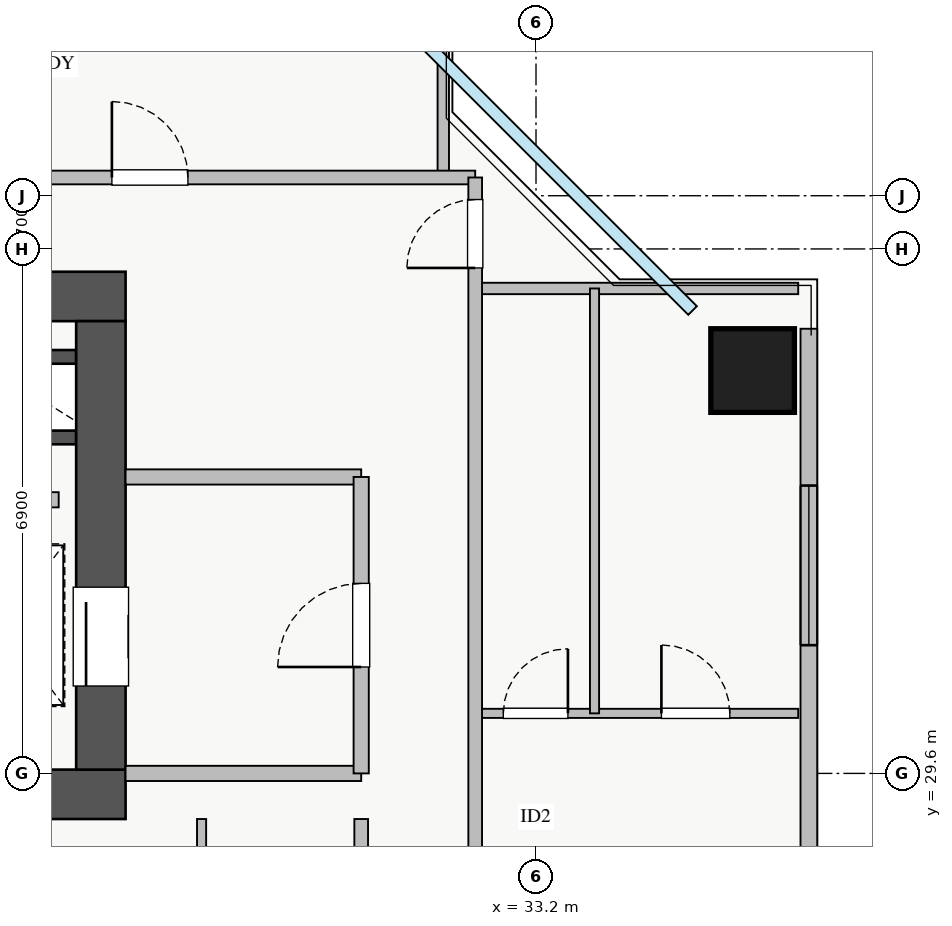
"""IFC4 building model, lengths in metres.
Left out: names, types, materials, properties, quantities, classifications, styles, units other than length and angle.
Written with IfcOpenShell. Run it as: python <this file> out.ifc"""

import sys

from ifc_helpers import new_model, si_unit, direction, frame, frame_2d, origin, origin_2d, place, context, subcontext, project, spatial, rectangle, extrude, source, transform, mapped, element, fill, save


model = new_model("IFC4")
c1 = context("Model", 3, precision=1e-05, world=origin(), true_north=direction((0.0, 1.0)))
c2 = subcontext(c1, "Body", "Model", "MODEL_VIEW")
j1 = project(units=[si_unit("LENGTHUNIT", "METRE"), si_unit("PLANEANGLEUNIT", "RADIAN")], contexts=[c1])
p1 = place(None, origin())
s1 = spatial("IfcSite", under=j1, at=p1, CompositionType="ELEMENT")
p2 = place(p1, origin())
s2 = spatial("IfcBuilding", under=s1, at=p2, CompositionType="ELEMENT")
p3 = place(p2, frame((0.0, 0.0, 132.75)))
s3 = spatial("IfcBuildingStorey", under=s2, at=p3, CompositionType="ELEMENT", Elevation=132.75)
for number, where, z_axis, x_axis in (
    (1, (25.8, 35.08, 0.0), (0.0, 0.0, 1.0), (1.0, 0.0, 0.0)),
    (2, (25.8, 34.02, 0.0), (0.0, 0.0, 1.0), (1.0, 0.0, 0.0)),
):
    element("IfcWall", number, at=place(p3, frame(where, z_axis=z_axis, x_axis=x_axis)), inside=s3, PredefinedType="SHEAR", context=c2, shape_type="SweptSolid", body=[
        extrude(rectangle(XDim=1.35, YDim=0.18, at=frame_2d((0.675, 0.0))), origin(), (0.0, 0.0, 1.0), 3.07),
    ])
p4 = place(p3, frame((10.2, 29.325, 0.0), z_axis=(0.0, 0.0, 1.0), x_axis=(1.0, 0.0, 0.0)))
e3 = element("IfcWall", 3, at=p4, inside=s3, PredefinedType="SHEAR", context=c2, shape_type="SweptSolid", body=[
    extrude(rectangle(XDim=17.6, YDim=0.65, at=frame_2d((8.8, 0.0))), origin(), (0.0, 0.0, 1.0), 3.25),
])
p5 = place(p3, frame((10.2, 35.875, 0.0), z_axis=(0.0, 0.0, 1.0), x_axis=(1.0, 0.0, 0.0)))
e4 = element("IfcWall", 4, at=p5, inside=s3, PredefinedType="SHEAR", context=c2, shape_type="SweptSolid", body=[
    extrude(rectangle(XDim=17.6, YDim=0.65, at=frame_2d((8.8, 0.0))), origin(), (0.0, 0.0, 1.0), 3.25),
])
p6 = place(p5, frame((1.15, 0.0, 0.0)))
e5 = element("IfcOpeningElement", 5, at=p6, cuts=e4, PredefinedType="OPENING", context=c2, shape_type="SweptSolid", body=[
    extrude(rectangle(XDim=1.1, YDim=2.05, at=frame_2d((0.55, 1.025))), frame((0.0, 0.335, 0.0), z_axis=(0.0, -1.0, 0.0), x_axis=(1.0, 0.0, 0.0)), (0.0, 0.0, 1.0), 0.67),
])
p7 = place(p5, frame((8.3, 0.0, 0.0)))
e6 = element("IfcOpeningElement", 6, at=p7, cuts=e4, PredefinedType="OPENING", context=c2, shape_type="SweptSolid", body=[
    extrude(rectangle(XDim=1.1, YDim=2.05, at=frame_2d((0.55, 1.025))), frame((0.0, 0.335, 0.0), z_axis=(0.0, -1.0, 0.0), x_axis=(1.0, 0.0, 0.0)), (0.0, 0.0, 1.0), 0.67),
])
p8 = place(p5, frame((4.9, 0.0, 0.0)))
e7 = element("IfcOpeningElement", 7, at=p8, cuts=e4, PredefinedType="OPENING", context=c2, shape_type="SweptSolid", body=[
    extrude(rectangle(XDim=1.1, YDim=2.05, at=frame_2d((0.55, 1.025))), frame((0.0, 0.335, 0.0), z_axis=(0.0, -1.0, 0.0), x_axis=(1.0, 0.0, 0.0)), (0.0, 0.0, 1.0), 0.67),
])
p9 = place(p5, frame((14.74, 0.0, 0.0)))
e8 = element("IfcOpeningElement", 8, at=p9, cuts=e4, PredefinedType="OPENING", context=c2, shape_type="SweptSolid", body=[
    extrude(rectangle(XDim=1.0, YDim=2.05, at=frame_2d((0.5, 1.025))), frame((0.0, 0.335, 0.0), z_axis=(0.0, -1.0, 0.0), x_axis=(1.0, 0.0, 0.0)), (0.0, 0.0, 1.0), 0.67),
])
p10 = place(p5, frame((10.005, 0.0, 0.0)))
e9 = element("IfcOpeningElement", 9, at=p10, cuts=e4, PredefinedType="OPENING", context=c2, shape_type="SweptSolid", body=[
    extrude(rectangle(XDim=1.0, YDim=2.05, at=frame_2d((0.5, 1.025))), frame((0.0, 0.335, 0.0), z_axis=(0.0, -1.0, 0.0), x_axis=(1.0, 0.0, 0.0)), (0.0, 0.0, 1.0), 0.67),
])
p11 = place(p5, frame((11.55, 0.0, 0.0)))
e10 = element("IfcOpeningElement", 10, at=p11, cuts=e4, PredefinedType="OPENING", context=c2, shape_type="SweptSolid", body=[
    extrude(rectangle(XDim=1.0, YDim=2.05, at=frame_2d((0.5, 1.025))), frame((0.0, 0.335, 0.0), z_axis=(0.0, -1.0, 0.0), x_axis=(1.0, 0.0, 0.0)), (0.0, 0.0, 1.0), 0.67),
])
p12 = place(p5, frame((13.215, 0.0, 0.0)))
e11 = element("IfcOpeningElement", 11, at=p12, cuts=e4, PredefinedType="OPENING", context=c2, shape_type="SweptSolid", body=[
    extrude(rectangle(XDim=1.0, YDim=2.05, at=frame_2d((0.5, 1.025))), frame((0.0, 0.335, 0.0), z_axis=(0.0, -1.0, 0.0), x_axis=(1.0, 0.0, 0.0)), (0.0, 0.0, 1.0), 0.67),
])
p13 = place(p3, frame((27.475, 29.65, 0.0), z_axis=(0.0, 0.0, 1.0), x_axis=(0.0, 1.0, 0.0)))
e12 = element("IfcWall", 12, at=p13, inside=s3, PredefinedType="SHEAR", context=c2, shape_type="SweptSolid", body=[
    extrude(rectangle(XDim=5.9, YDim=0.65, at=frame_2d((2.95, 0.0))), origin(), (0.0, 0.0, 1.0), 3.25),
])
p14 = place(p13, frame((1.1, 0.0, 0.0)))
e13 = element("IfcOpeningElement", 13, at=p14, cuts=e12, PredefinedType="OPENING", context=c2, shape_type="SweptSolid", body=[
    extrude(rectangle(XDim=1.3, YDim=2.05, at=frame_2d((0.65, 1.025))), frame((0.0, 0.335, 0.0), z_axis=(0.0, -1.0, 0.0), x_axis=(1.0, 0.0, 0.0)), (0.0, 0.0, 1.0), 0.67),
])
m1 = source(origin(), c2, "Body", "SweptSolid", [
    extrude(rectangle(XDim=1.1, YDim=1.1, at=origin_2d()), origin(), (0.0, 0.0, 1.0), 3.25),
])
p15 = place(p3, frame((36.05, 34.9, 0.0), z_axis=(0.0, 0.0, 1.0), x_axis=(1.0, 0.0, 0.0)))
e14 = element("IfcColumn", 14, at=p15, inside=s3, PredefinedType="COLUMN", context=c2, shape_type="MappedRepresentation", body=[
    mapped(m1, transform((0.0, 0.0, 0.0), x_axis=(1.0, 0.0, 0.0), y_axis=(0.0, 1.0, 0.0), z_axis=(0.0, 0.0, 1.0), scale=1.0)),
])
p16 = place(p3, frame((36.79, 10.55, 0.0), z_axis=(0.0, 0.0, 1.0), x_axis=(0.0, 1.0, 0.0)))
e15 = element("IfcWall", 15, at=p16, inside=s3, PredefinedType="STANDARD", context=c2, shape_type="SweptSolid", body=[
    extrude(rectangle(XDim=24.9, YDim=0.22, at=frame_2d((12.45, 0.0))), origin(), (0.0, 0.0, 1.0), 2.61),
])
p17 = place(p16, frame((13.3, 0.0, 0.0)))
e16 = element("IfcOpeningElement", 16, at=p17, cuts=e15, PredefinedType="OPENING", context=c2, shape_type="SweptSolid", body=[
    extrude(rectangle(XDim=1.2, YDim=2.1, at=frame_2d((0.6, 1.05))), frame((0.0, 0.12, 0.0), z_axis=(0.0, -1.0, 0.0), x_axis=(1.0, 0.0, 0.0)), (0.0, 0.0, 1.0), 0.24),
])
p18 = place(p16, frame((1.912, 0.0, 0.9)))
e17 = element("IfcOpeningElement", 17, at=p18, cuts=e15, PredefinedType="OPENING", context=c2, shape_type="SweptSolid", body=[
    extrude(rectangle(XDim=2.4, YDim=1.48, at=frame_2d((1.2, 0.74))), frame((0.0, 0.12, 0.0), z_axis=(0.0, -1.0, 0.0), x_axis=(1.0, 0.0, 0.0)), (0.0, 0.0, 1.0), 0.24),
])
p19 = place(p16, frame((20.737, 0.0, 0.9)))
e18 = element("IfcOpeningElement", 18, at=p19, cuts=e15, PredefinedType="OPENING", context=c2, shape_type="SweptSolid", body=[
    extrude(rectangle(XDim=2.1, YDim=1.48, at=frame_2d((1.05, 0.74))), frame((0.0, 0.12, 0.0), z_axis=(0.0, -1.0, 0.0), x_axis=(1.0, 0.0, 0.0)), (0.0, 0.0, 1.0), 0.24),
])
p20 = place(p16, frame((14.72, 0.0, 0.9)))
e19 = element("IfcOpeningElement", 19, at=p20, cuts=e15, PredefinedType="OPENING", context=c2, shape_type="SweptSolid", body=[
    extrude(rectangle(XDim=0.9, YDim=1.2, at=frame_2d((0.45, 0.6))), frame((0.0, 0.12, 0.0), z_axis=(0.0, -1.0, 0.0), x_axis=(1.0, 0.0, 0.0)), (0.0, 0.0, 1.0), 0.24),
])
for number, where, z_axis, x_axis in (
    (20, (27.8, 29.6, 0.0), (0.0, 0.0, 1.0), (1.0, 0.0, 0.0)),
    (21, (27.8, 33.5, 0.0), (0.0, 0.0, 1.0), (1.0, 0.0, 0.0)),
):
    element("IfcWall", number, at=place(p3, frame(where, z_axis=z_axis, x_axis=x_axis)), inside=s3, PredefinedType="PARTITIONING", context=c2, shape_type="SweptSolid", body=[
        extrude(rectangle(XDim=3.1, YDim=0.2, at=frame_2d((1.55, 0.0))), origin(), (0.0, 0.0, 1.0), 3.07),
    ])
p21 = place(p3, frame((30.9, 29.6, 0.0), z_axis=(0.0, 0.0, 1.0), x_axis=(0.0, 1.0, 0.0)))
e22 = element("IfcWall", 22, at=p21, inside=s3, PredefinedType="PARTITIONING", context=c2, shape_type="SweptSolid", body=[
    extrude(rectangle(XDim=3.9, YDim=0.2, at=frame_2d((1.95, 0.0))), origin(), (0.0, 0.0, 1.0), 3.07),
])
p22 = place(p21, frame((1.4, 0.0, 0.0)))
e23 = element("IfcOpeningElement", 23, at=p22, cuts=e22, PredefinedType="OPENING", context=c2, shape_type="SweptSolid", body=[
    extrude(rectangle(XDim=1.1, YDim=2.05, at=frame_2d((0.55, 1.025))), frame((0.0, 0.11, 0.0), z_axis=(0.0, -1.0, 0.0), x_axis=(1.0, 0.0, 0.0)), (0.0, 0.0, 1.0), 0.22),
])
p23 = place(p3, frame((21.75, 33.2, 0.0), z_axis=(0.0, 0.0, 1.0), x_axis=(1.0, 0.0, 0.0)))
e24 = element("IfcWall", 24, at=p23, inside=s3, PredefinedType="PARTITIONING", context=c2, shape_type="SweptSolid", body=[
    extrude(rectangle(XDim=5.17, YDim=0.2, at=frame_2d((2.585, 0.0))), origin(), (0.0, 0.0, 1.0), 3.07),
])
p24 = place(p3, frame((31.98, 37.44, 0.0), z_axis=(0.0, 0.0, 1.0), x_axis=(0.0, 1.0, 0.0)))
e25 = element("IfcWall", 25, at=p24, inside=s3, PredefinedType="PARTITIONING", context=c2, shape_type="SweptSolid", body=[
    extrude(rectangle(XDim=3.21, YDim=0.15, at=frame_2d((1.605, 0.0))), origin(), (0.0, 0.0, 1.0), 3.07),
])
p25 = place(p3, frame((8.82, 37.44, 0.0), z_axis=(0.0, 0.0, 1.0), x_axis=(1.0, 0.0, 0.0)))
e26 = element("IfcWall", 26, at=p25, inside=s3, PredefinedType="PARTITIONING", context=c2, shape_type="SweptSolid", body=[
    extrude(rectangle(XDim=23.58, YDim=0.18, at=frame_2d((11.79, 0.0))), origin(), (0.0, 0.0, 1.0), 3.07),
])
p26 = place(p25, frame((3.085, 0.0, 0.0)))
e27 = element("IfcOpeningElement", 27, at=p26, cuts=e26, PredefinedType="OPENING", context=c2, shape_type="SweptSolid", body=[
    extrude(rectangle(XDim=1.0, YDim=2.05, at=frame_2d((0.5, 1.025))), frame((0.0, 0.1, 0.0), z_axis=(0.0, -1.0, 0.0), x_axis=(1.0, 0.0, 0.0)), (0.0, 0.0, 1.0), 0.2),
])
p27 = place(p25, frame((10.805, 0.0, 0.0)))
e28 = element("IfcOpeningElement", 28, at=p27, cuts=e26, PredefinedType="OPENING", context=c2, shape_type="SweptSolid", body=[
    extrude(rectangle(XDim=1.0, YDim=2.05, at=frame_2d((0.5, 1.025))), frame((0.0, 0.1, 0.0), z_axis=(0.0, -1.0, 0.0), x_axis=(1.0, 0.0, 0.0)), (0.0, 0.0, 1.0), 0.2),
])
p28 = place(p25, frame((18.8, 0.0, 0.0)))
e29 = element("IfcOpeningElement", 29, at=p28, cuts=e26, PredefinedType="OPENING", context=c2, shape_type="SweptSolid", body=[
    extrude(rectangle(XDim=1.0, YDim=2.05, at=frame_2d((0.5, 1.025))), frame((0.0, 0.1, 0.0), z_axis=(0.0, -1.0, 0.0), x_axis=(1.0, 0.0, 0.0)), (0.0, 0.0, 1.0), 0.2),
])
p29 = place(p3, frame((32.4, 35.98, 0.0), z_axis=(0.0, 0.0, 1.0), x_axis=(1.0, 0.0, 0.0)))
e30 = element("IfcWall", 30, at=p29, inside=s3, PredefinedType="PARTITIONING", context=c2, shape_type="SweptSolid", body=[
    extrude(rectangle(XDim=4.25, YDim=0.15, at=frame_2d((2.125, 0.0))), origin(), (0.0, 0.0, 1.0), 3.07),
])
p30 = place(p3, frame((32.4, 30.39, 0.0), z_axis=(0.0, 0.0, 1.0), x_axis=(1.0, 0.0, 0.0)))
e31 = element("IfcWall", 31, at=p30, inside=s3, PredefinedType="PLUMBINGWALL", context=c2, shape_type="SweptSolid", body=[
    extrude(rectangle(XDim=4.25, YDim=0.12, at=frame_2d((2.125, 0.0))), origin(), (0.0, 0.0, 1.0), 3.07),
])
p31 = place(p30, frame((0.37, 0.0, 0.0)))
e32 = element("IfcOpeningElement", 32, at=p31, cuts=e31, PredefinedType="OPENING", context=c2, shape_type="SweptSolid", body=[
    extrude(rectangle(XDim=0.85, YDim=2.05, at=frame_2d((0.425, 1.025))), frame((0.0, 0.07, 0.0), z_axis=(0.0, -1.0, 0.0), x_axis=(1.0, 0.0, 0.0)), (0.0, 0.0, 1.0), 0.14),
])
p32 = place(p30, frame((2.45, 0.0, 0.0)))
e33 = element("IfcOpeningElement", 33, at=p32, cuts=e31, PredefinedType="OPENING", context=c2, shape_type="SweptSolid", body=[
    extrude(rectangle(XDim=0.9, YDim=2.05, at=frame_2d((0.45, 1.025))), frame((0.0, 0.07, 0.0), z_axis=(0.0, -1.0, 0.0), x_axis=(1.0, 0.0, 0.0)), (0.0, 0.0, 1.0), 0.14),
])
p33 = place(p3, frame((33.97, 30.39, 0.0), z_axis=(0.0, 0.0, 1.0), x_axis=(0.0, 1.0, 0.0)))
e34 = element("IfcWall", 34, at=p33, inside=s3, PredefinedType="PLUMBINGWALL", context=c2, shape_type="SweptSolid", body=[
    extrude(rectangle(XDim=5.59, YDim=0.12, at=frame_2d((2.795, 0.0))), origin(), (0.0, 0.0, 1.0), 3.07),
])
p34 = place(p3, frame((32.4, 8.31, 0.0), z_axis=(0.0, 0.0, 1.0), x_axis=(0.0, 1.0, 0.0)))
e35 = element("IfcWall", 35, at=p34, inside=s3, PredefinedType="PARTITIONING", context=c2, shape_type="SweptSolid", body=[
    extrude(rectangle(XDim=29.13, YDim=0.18, at=frame_2d((14.565, 0.0))), origin(), (0.0, 0.0, 1.0), 3.07),
])
p35 = place(p34, frame((27.94, 0.0, 0.0)))
e36 = element("IfcOpeningElement", 36, at=p35, cuts=e35, PredefinedType="OPENING", context=c2, shape_type="SweptSolid", body=[
    extrude(rectangle(XDim=0.9, YDim=2.05, at=frame_2d((0.45, 1.025))), frame((0.0, 0.1, 0.0), z_axis=(0.0, -1.0, 0.0), x_axis=(1.0, 0.0, 0.0)), (0.0, 0.0, 1.0), 0.2),
])
p36 = place(p34, frame((0.415, 0.0, 0.0)))
e37 = element("IfcOpeningElement", 37, at=p36, cuts=e35, PredefinedType="OPENING", context=c2, shape_type="SweptSolid", body=[
    extrude(rectangle(XDim=0.9, YDim=2.05, at=frame_2d((0.45, 1.025))), frame((0.0, 0.1, 0.0), z_axis=(0.0, -1.0, 0.0), x_axis=(1.0, 0.0, 0.0)), (0.0, 0.0, 1.0), 0.2),
])
p37 = place(p34, frame((4.75, 0.0, 0.0)))
e38 = element("IfcOpeningElement", 38, at=p37, cuts=e35, PredefinedType="OPENING", context=c2, shape_type="SweptSolid", body=[
    extrude(rectangle(XDim=1.0, YDim=2.05, at=frame_2d((0.5, 1.025))), frame((0.0, 0.1, 0.0), z_axis=(0.0, -1.0, 0.0), x_axis=(1.0, 0.0, 0.0)), (0.0, 0.0, 1.0), 0.2),
])
p38 = place(p34, frame((18.11, 0.0, 0.0)))
e39 = element("IfcOpeningElement", 39, at=p38, cuts=e35, PredefinedType="OPENING", context=c2, shape_type="SweptSolid", body=[
    extrude(rectangle(XDim=1.0, YDim=2.05, at=frame_2d((0.5, 1.025))), frame((0.0, 0.1, 0.0), z_axis=(0.0, -1.0, 0.0), x_axis=(1.0, 0.0, 0.0)), (0.0, 0.0, 1.0), 0.2),
])
p39 = place(p3, frame((28.8, 23.1, 0.0), z_axis=(0.0, 0.0, 1.0), x_axis=(0.0, 1.0, 0.0)))
e40 = element("IfcWall", 40, at=p39, inside=s3, PredefinedType="PLUMBINGWALL", context=c2, shape_type="SweptSolid", body=[
    extrude(rectangle(XDim=5.9, YDim=0.12, at=frame_2d((2.95, 0.0))), origin(), (0.0, 0.0, 1.0), 3.07),
])
p40 = place(p3, frame((30.9, 17.0, 0.0), z_axis=(0.0, 0.0, 1.0), x_axis=(0.0, 1.0, 0.0)))
e41 = element("IfcWall", 41, at=p40, inside=s3, PredefinedType="PARTITIONING", context=c2, shape_type="SweptSolid", body=[
    extrude(rectangle(XDim=12.0, YDim=0.18, at=frame_2d((6.0, 0.0))), origin(), (0.0, 0.0, 1.0), 3.07),
])
p41 = place(p40, frame((2.36, 0.0, 0.0)))
e42 = element("IfcOpeningElement", 42, at=p41, cuts=e41, PredefinedType="OPENING", context=c2, shape_type="SweptSolid", body=[
    extrude(rectangle(XDim=1.0, YDim=2.05, at=frame_2d((0.5, 1.025))), frame((0.0, 0.1, 0.0), z_axis=(0.0, -1.0, 0.0), x_axis=(1.0, 0.0, 0.0)), (0.0, 0.0, 1.0), 0.2),
])
m2 = source(origin(), c2, "Body", "SweptSolid", [
    extrude(rectangle(XDim=2.1, YDim=1.48, at=frame_2d((1.05, 0.74))), frame((0.0, 0.03, 0.0), z_axis=(0.0, -1.0, 0.0), x_axis=(1.0, 0.0, 0.0)), (0.0, 0.0, 1.0), 0.06),
])
p42 = place(p19, origin())
e43 = element("IfcWindow", 43, at=p42, inside=s3, PartitioningType="TRIPLE_PANEL_VERTICAL", PredefinedType="WINDOW", context=c2, shape_type="MappedRepresentation", body=[
    mapped(m2, transform((0.0, 0.0, 0.0), x_axis=(1.0, 0.0, 0.0), y_axis=(0.0, 1.0, 0.0), z_axis=(0.0, 0.0, 1.0), scale=1.0)),
])
fill(e18, e43)
m3 = source(origin(), c2, "Body", "SweptSolid", [
    extrude(rectangle(XDim=1.3, YDim=2.05, at=frame_2d((0.65, 1.025))), frame((0.0, 0.025, 0.0), z_axis=(0.0, -1.0, 0.0), x_axis=(1.0, 0.0, 0.0)), (0.0, 0.0, 1.0), 0.05),
])
p43 = place(p14, origin())
e44 = element("IfcDoor", 44, at=p43, inside=s3, OperationType="SLIDING_TO_LEFT", PredefinedType="DOOR", context=c2, shape_type="MappedRepresentation", body=[
    mapped(m3, transform((0.0, 0.0, 0.0), x_axis=(1.0, 0.0, 0.0), y_axis=(0.0, 1.0, 0.0), z_axis=(0.0, 0.0, 1.0), scale=1.0)),
])
fill(e13, e44)
m4 = source(origin(), c2, "Body", "SweptSolid", [
    extrude(rectangle(XDim=1.1, YDim=2.05, at=frame_2d((0.55, 1.025))), frame((0.0, 0.025, 0.0), z_axis=(0.0, -1.0, 0.0), x_axis=(1.0, 0.0, 0.0)), (0.0, 0.0, 1.0), 0.05),
])
p44 = place(p22, origin())
e45 = element("IfcDoor", 45, at=p44, inside=s3, OperationType="SINGLE_SWING_LEFT", PredefinedType="DOOR", context=c2, shape_type="MappedRepresentation", body=[
    mapped(m4, transform((0.0, 0.0, 0.0), x_axis=(1.0, 0.0, 0.0), y_axis=(0.0, 1.0, 0.0), z_axis=(0.0, 0.0, 1.0), scale=1.0)),
])
fill(e23, e45)
m5 = source(origin(), c2, "Body", "SweptSolid", [
    extrude(rectangle(XDim=1.0, YDim=2.05, at=frame_2d((0.5, 1.025))), frame((0.0, 0.025, 0.0), z_axis=(0.0, -1.0, 0.0), x_axis=(1.0, 0.0, 0.0)), (0.0, 0.0, 1.0), 0.05),
])
p45 = place(p28, origin())
e46 = element("IfcDoor", 46, at=p45, inside=s3, OperationType="SINGLE_SWING_LEFT", PredefinedType="DOOR", context=c2, shape_type="MappedRepresentation", body=[
    mapped(m5, transform((0.0, 0.0, 0.0), x_axis=(1.0, 0.0, 0.0), y_axis=(0.0, 1.0, 0.0), z_axis=(0.0, 0.0, 1.0), scale=1.0)),
])
fill(e29, e46)
m6 = source(origin(), c2, "Body", "SweptSolid", [
    extrude(rectangle(XDim=0.85, YDim=2.05, at=frame_2d((0.425, 1.025))), frame((0.0, 0.025, 0.0), z_axis=(0.0, -1.0, 0.0), x_axis=(1.0, 0.0, 0.0)), (0.0, 0.0, 1.0), 0.05),
])
p46 = place(p31, origin())
e47 = element("IfcDoor", 47, at=p46, inside=s3, OperationType="SINGLE_SWING_RIGHT", PredefinedType="DOOR", context=c2, shape_type="MappedRepresentation", body=[
    mapped(m6, transform((0.0, 0.0, 0.0), x_axis=(1.0, 0.0, 0.0), y_axis=(0.0, 1.0, 0.0), z_axis=(0.0, 0.0, 1.0), scale=1.0)),
])
fill(e32, e47)
m7 = source(origin(), c2, "Body", "SweptSolid", [
    extrude(rectangle(XDim=0.9, YDim=2.05, at=frame_2d((0.45, 1.025))), frame((0.0, 0.025, 0.0), z_axis=(0.0, -1.0, 0.0), x_axis=(1.0, 0.0, 0.0)), (0.0, 0.0, 1.0), 0.05),
])
p47 = place(p32, origin())
e48 = element("IfcDoor", 48, at=p47, inside=s3, OperationType="SINGLE_SWING_LEFT", PredefinedType="DOOR", context=c2, shape_type="MappedRepresentation", body=[
    mapped(m7, transform((0.0, 0.0, 0.0), x_axis=(1.0, 0.0, 0.0), y_axis=(0.0, 1.0, 0.0), z_axis=(0.0, 0.0, 1.0), scale=1.0)),
])
fill(e33, e48)
p48 = place(p35, origin())
e49 = element("IfcDoor", 49, at=p48, inside=s3, OperationType="SINGLE_SWING_LEFT", PredefinedType="DOOR", context=c2, shape_type="MappedRepresentation", body=[
    mapped(m7, transform((0.0, 0.0, 0.0), x_axis=(1.0, 0.0, 0.0), y_axis=(0.0, 1.0, 0.0), z_axis=(0.0, 0.0, 1.0), scale=1.0)),
])
fill(e36, e49)
save(model, sys.argv[1])
